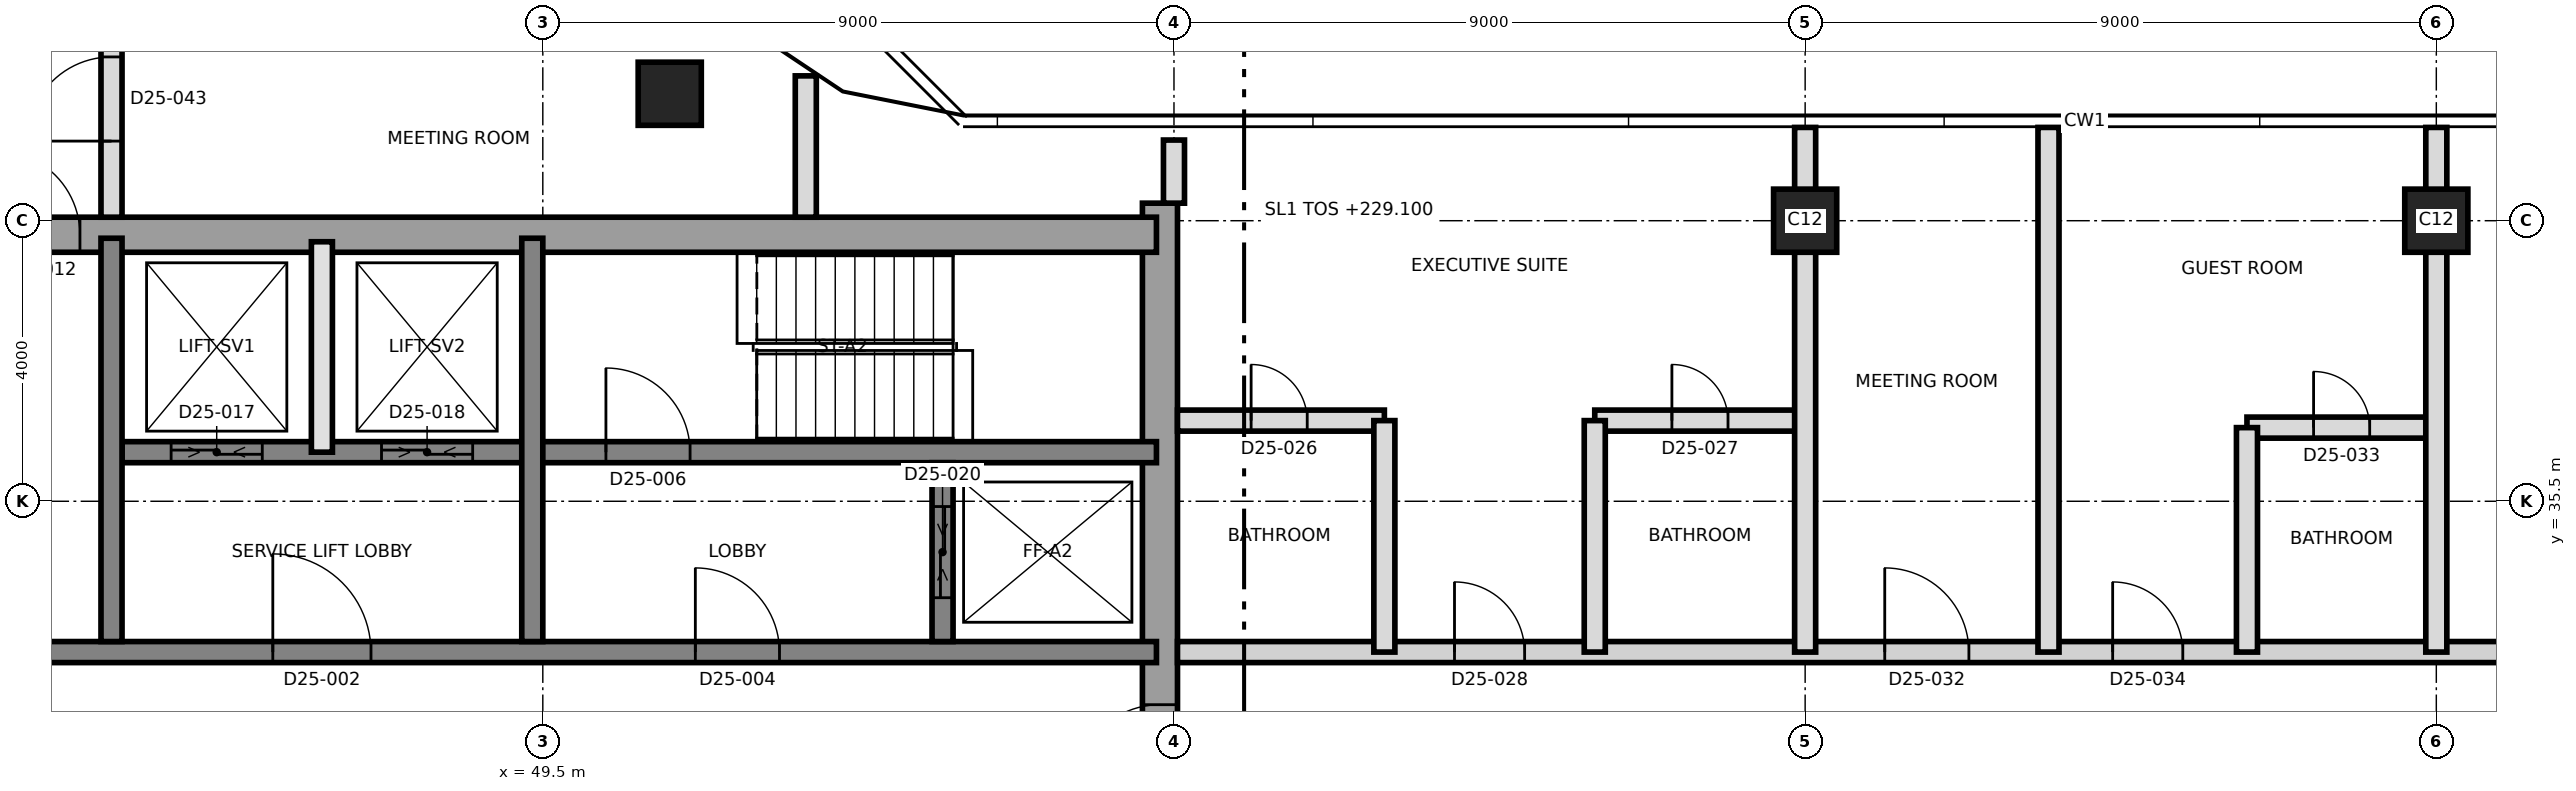
"""IFC4 building model, lengths in metres.
Left out: names, types, materials, properties, quantities, classifications, styles, units other than length and angle.
Written with IfcOpenShell. Run it as: python <this file> out.ifc"""

import sys

from ifc_helpers import new_model, si_unit, direction, frame, frame_2d, origin, origin_2d, place, context, subcontext, project, spatial, rectangle, extrude, element, fill, save


model = new_model("IFC4")
c1 = context("Model", 3, precision=1e-05, world=origin(), true_north=direction((0.0, 1.0)))
c2 = subcontext(c1, "Body", "Model", "MODEL_VIEW")
j1 = project(units=[si_unit("LENGTHUNIT", "METRE"), si_unit("PLANEANGLEUNIT", "RADIAN")], contexts=[c1])
p1 = place(None, origin())
s1 = spatial("IfcSite", under=j1, at=p1, CompositionType="ELEMENT")
p2 = place(p1, origin())
s2 = spatial("IfcBuilding", under=s1, at=p2, CompositionType="ELEMENT")
p3 = place(p2, frame((0.0, 0.0, 229.1)))
s3 = spatial("IfcBuildingStorey", under=s2, at=p3, CompositionType="ELEMENT", Elevation=229.1)
p4 = place(p3, frame((58.3, 21.25, 0.0), z_axis=(0.0, 0.0, 1.0), x_axis=(0.0, 1.0, 0.0)))
e1 = element("IfcWall", 1, at=p4, inside=s3, PredefinedType="SHEAR", context=c2, shape_type="SweptSolid", body=[
    extrude(rectangle(XDim=18.5, YDim=0.5, at=frame_2d((9.25, 0.0))), origin(), (0.0, 0.0, 1.0), 3.7),
])
p5 = place(p4, frame((10.15, 0.0, 0.0)))
e2 = element("IfcOpeningElement", 2, at=p5, cuts=e1, PredefinedType="OPENING", context=c2, shape_type="SweptSolid", body=[
    extrude(rectangle(XDim=1.2, YDim=2.1, at=frame_2d((0.6, 1.05))), frame((0.0, 0.26, 0.0), z_axis=(0.0, -1.0, 0.0), x_axis=(1.0, 0.0, 0.0)), (0.0, 0.0, 1.0), 0.52),
])
p6 = place(p3, frame((31.25, 39.3, 0.0), z_axis=(0.0, 0.0, 1.0), x_axis=(1.0, 0.0, 0.0)))
e3 = element("IfcWall", 3, at=p6, inside=s3, PredefinedType="SHEAR", context=c2, shape_type="SweptSolid", body=[
    extrude(rectangle(XDim=27.0, YDim=0.5, at=frame_2d((13.5, 0.0))), origin(), (0.0, 0.0, 1.0), 3.7),
])
p7 = place(p6, frame((10.45, 0.0, 0.0)))
e4 = element("IfcOpeningElement", 4, at=p7, cuts=e3, PredefinedType="OPENING", context=c2, shape_type="SweptSolid", body=[
    extrude(rectangle(XDim=1.2, YDim=2.1, at=frame_2d((0.6, 1.05))), frame((0.0, 0.26, 0.0), z_axis=(0.0, -1.0, 0.0), x_axis=(1.0, 0.0, 0.0)), (0.0, 0.0, 1.0), 0.52),
])
p8 = place(p3, frame((31.75, 33.35, 0.0), z_axis=(0.0, 0.0, 1.0), x_axis=(1.0, 0.0, 0.0)))
e5 = element("IfcWall", 5, at=p8, inside=s3, PredefinedType="SHEAR", context=c2, shape_type="SweptSolid", body=[
    extrude(rectangle(XDim=26.5, YDim=0.3, at=frame_2d((13.25, 0.0))), origin(), (0.0, 0.0, 1.0), 3.7),
])
p9 = place(p8, frame((13.9, 0.0, 0.0)))
e6 = element("IfcOpeningElement", 6, at=p9, cuts=e5, PredefinedType="OPENING", context=c2, shape_type="SweptSolid", body=[
    extrude(rectangle(XDim=1.4, YDim=2.1, at=frame_2d((0.7, 1.05))), frame((0.0, 0.16, 0.0), z_axis=(0.0, -1.0, 0.0), x_axis=(1.0, 0.0, 0.0)), (0.0, 0.0, 1.0), 0.32),
])
p10 = place(p8, frame((5.375, 0.0, 0.0)))
e7 = element("IfcOpeningElement", 7, at=p10, cuts=e5, PredefinedType="OPENING", context=c2, shape_type="SweptSolid", body=[
    extrude(rectangle(XDim=1.2, YDim=2.1, at=frame_2d((0.6, 1.05))), frame((0.0, 0.16, 0.0), z_axis=(0.0, -1.0, 0.0), x_axis=(1.0, 0.0, 0.0)), (0.0, 0.0, 1.0), 0.32),
])
p11 = place(p8, frame((19.925, 0.0, 0.0)))
e8 = element("IfcOpeningElement", 8, at=p11, cuts=e5, PredefinedType="OPENING", context=c2, shape_type="SweptSolid", body=[
    extrude(rectangle(XDim=1.2, YDim=2.1, at=frame_2d((0.6, 1.05))), frame((0.0, 0.16, 0.0), z_axis=(0.0, -1.0, 0.0), x_axis=(1.0, 0.0, 0.0)), (0.0, 0.0, 1.0), 0.32),
])
p12 = place(p3, frame((43.5, 36.2, 0.0), z_axis=(0.0, 0.0, 1.0), x_axis=(1.0, 0.0, 0.0)))
e9 = element("IfcWall", 9, at=p12, inside=s3, PredefinedType="SHEAR", context=c2, shape_type="SweptSolid", body=[
    extrude(rectangle(XDim=14.75, YDim=0.3, at=frame_2d((7.375, 0.0))), origin(), (0.0, 0.0, 1.0), 3.7),
])
p13 = place(p12, frame((6.9, 0.0, 0.0)))
e10 = element("IfcOpeningElement", 10, at=p13, cuts=e9, PredefinedType="OPENING", context=c2, shape_type="SweptSolid", body=[
    extrude(rectangle(XDim=1.2, YDim=2.1, at=frame_2d((0.6, 1.05))), frame((0.0, 0.16, 0.0), z_axis=(0.0, -1.0, 0.0), x_axis=(1.0, 0.0, 0.0)), (0.0, 0.0, 1.0), 0.32),
])
p14 = place(p12, frame((0.7, 0.0, 0.0)))
e11 = element("IfcOpeningElement", 11, at=p14, cuts=e9, PredefinedType="OPENING", context=c2, shape_type="SweptSolid", body=[
    extrude(rectangle(XDim=1.3, YDim=2.4, at=frame_2d((0.65, 1.2))), frame((0.0, 0.16, 0.0), z_axis=(0.0, -1.0, 0.0), x_axis=(1.0, 0.0, 0.0)), (0.0, 0.0, 1.0), 0.32),
])
p15 = place(p12, frame((3.7, 0.0, 0.0)))
e12 = element("IfcOpeningElement", 12, at=p15, cuts=e9, PredefinedType="OPENING", context=c2, shape_type="SweptSolid", body=[
    extrude(rectangle(XDim=1.3, YDim=2.4, at=frame_2d((0.65, 1.2))), frame((0.0, 0.16, 0.0), z_axis=(0.0, -1.0, 0.0), x_axis=(1.0, 0.0, 0.0)), (0.0, 0.0, 1.0), 0.32),
])
for number, where, z_axis, x_axis in (
    (13, (43.35, 33.5, 0.0), (0.0, 0.0, 1.0), (0.0, 1.0, 0.0)),
    (14, (49.35, 33.5, 0.0), (0.0, 0.0, 1.0), (0.0, 1.0, 0.0)),
):
    element("IfcWall", number, at=place(p3, frame(where, z_axis=z_axis, x_axis=x_axis)), inside=s3, PredefinedType="SHEAR", context=c2, shape_type="SweptSolid", body=[
        extrude(rectangle(XDim=5.75, YDim=0.3, at=frame_2d((2.875, 0.0))), origin(), (0.0, 0.0, 1.0), 3.7),
    ])
p16 = place(p3, frame((55.2, 33.5, 0.0), z_axis=(0.0, 0.0, 1.0), x_axis=(0.0, 1.0, 0.0)))
e15 = element("IfcWall", 15, at=p16, inside=s3, PredefinedType="SHEAR", context=c2, shape_type="SweptSolid", body=[
    extrude(rectangle(XDim=2.55, YDim=0.3, at=frame_2d((1.275, 0.0))), origin(), (0.0, 0.0, 1.0), 3.7),
])
p17 = place(p16, frame((0.625, 0.0, 0.0)))
e16 = element("IfcOpeningElement", 16, at=p17, cuts=e15, PredefinedType="OPENING", context=c2, shape_type="SweptSolid", body=[
    extrude(rectangle(XDim=1.3, YDim=2.4, at=frame_2d((0.65, 1.2))), frame((0.0, 0.16, 0.0), z_axis=(0.0, -1.0, 0.0), x_axis=(1.0, 0.0, 0.0)), (0.0, 0.0, 1.0), 0.32),
])
for number, where, z_axis, x_axis in (
    (17, (67.5, 39.5, 0.0), (0.0, 0.0, 1.0), (1.0, 0.0, 0.0)),
    (18, (76.5, 39.5, 0.0), (0.0, 0.0, 1.0), (1.0, 0.0, 0.0)),
    (19, (51.31, 41.31, 0.0), (0.0, 0.0, 1.0), (1.0, 0.0, 0.0)),
):
    element("IfcColumn", number, at=place(p3, frame(where, z_axis=z_axis, x_axis=x_axis)), inside=s3, PredefinedType="COLUMN", context=c2, shape_type="SweptSolid", body=[
        extrude(rectangle(XDim=0.9, YDim=0.9, at=origin_2d()), origin(), (0.0, 0.0, 1.0), 3.7),
    ])
p18 = place(p3, frame((46.35, 36.2, 0.0), z_axis=(0.0, 0.0, 1.0), x_axis=(0.0, 1.0, 0.0)))
e20 = element("IfcWall", 20, at=p18, inside=s3, PredefinedType="SOLIDWALL", context=c2, shape_type="SweptSolid", body=[
    extrude(rectangle(XDim=3.0, YDim=0.3, at=frame_2d((1.5, 0.0))), origin(), (0.0, 0.0, 1.0), 3.4),
])
p19 = place(p3, frame((58.55, 33.35, 0.0), z_axis=(0.0, 0.0, 1.0), x_axis=(1.0, 0.0, 0.0)))
e21 = element("IfcWall", 21, at=p19, inside=s3, PredefinedType="PARTITIONING", context=c2, shape_type="SweptSolid", body=[
    extrude(rectangle(XDim=26.78, YDim=0.3, at=frame_2d((13.39, 0.0))), origin(), (0.0, 0.0, 1.0), 3.4),
])
p20 = place(p19, frame((3.95, 0.0, 0.0)))
e22 = element("IfcOpeningElement", 22, at=p20, cuts=e21, PredefinedType="OPENING", context=c2, shape_type="SweptSolid", body=[
    extrude(rectangle(XDim=1.0, YDim=2.4, at=frame_2d((0.5, 1.2))), frame((0.0, 0.16, 0.0), z_axis=(0.0, -1.0, 0.0), x_axis=(1.0, 0.0, 0.0)), (0.0, 0.0, 1.0), 0.32),
])
p21 = place(p19, frame((10.085, 0.0, 0.0)))
e23 = element("IfcOpeningElement", 23, at=p21, cuts=e21, PredefinedType="OPENING", context=c2, shape_type="SweptSolid", body=[
    extrude(rectangle(XDim=1.2, YDim=2.1, at=frame_2d((0.6, 1.05))), frame((0.0, 0.16, 0.0), z_axis=(0.0, -1.0, 0.0), x_axis=(1.0, 0.0, 0.0)), (0.0, 0.0, 1.0), 0.32),
])
p22 = place(p19, frame((13.335, 0.0, 0.0)))
e24 = element("IfcOpeningElement", 24, at=p22, cuts=e21, PredefinedType="OPENING", context=c2, shape_type="SweptSolid", body=[
    extrude(rectangle(XDim=1.0, YDim=2.1, at=frame_2d((0.5, 1.05))), frame((0.0, 0.16, 0.0), z_axis=(0.0, -1.0, 0.0), x_axis=(1.0, 0.0, 0.0)), (0.0, 0.0, 1.0), 0.32),
])
p23 = place(p19, frame((20.3, 0.0, 0.0)))
e25 = element("IfcOpeningElement", 25, at=p23, cuts=e21, PredefinedType="OPENING", context=c2, shape_type="SweptSolid", body=[
    extrude(rectangle(XDim=1.0, YDim=2.4, at=frame_2d((0.5, 1.2))), frame((0.0, 0.16, 0.0), z_axis=(0.0, -1.0, 0.0), x_axis=(1.0, 0.0, 0.0)), (0.0, 0.0, 1.0), 0.32),
])
p24 = place(p3, frame((73.8, 36.55, 0.0), z_axis=(0.0, 0.0, 1.0), x_axis=(1.0, 0.0, 0.0)))
e26 = element("IfcWall", 26, at=p24, inside=s3, PredefinedType="PARTITIONING", context=c2, shape_type="SweptSolid", body=[
    extrude(rectangle(XDim=2.7, YDim=0.3, at=frame_2d((1.35, 0.0))), origin(), (0.0, 0.0, 1.0), 3.4),
])
p25 = place(p24, frame((0.95, 0.0, 0.0)))
e27 = element("IfcOpeningElement", 27, at=p25, cuts=e26, PredefinedType="OPENING", context=c2, shape_type="SweptSolid", body=[
    extrude(rectangle(XDim=0.8, YDim=2.1, at=frame_2d((0.4, 1.05))), frame((0.0, 0.16, 0.0), z_axis=(0.0, -1.0, 0.0), x_axis=(1.0, 0.0, 0.0)), (0.0, 0.0, 1.0), 0.32),
])
p26 = place(p3, frame((58.55, 36.65, 0.0), z_axis=(0.0, 0.0, 1.0), x_axis=(1.0, 0.0, 0.0)))
e28 = element("IfcWall", 28, at=p26, inside=s3, PredefinedType="PARTITIONING", context=c2, shape_type="SweptSolid", body=[
    extrude(rectangle(XDim=2.95, YDim=0.3, at=frame_2d((1.475, 0.0))), origin(), (0.0, 0.0, 1.0), 3.4),
])
p27 = place(p26, frame((1.05, 0.0, 0.0)))
e29 = element("IfcOpeningElement", 29, at=p27, cuts=e28, PredefinedType="OPENING", context=c2, shape_type="SweptSolid", body=[
    extrude(rectangle(XDim=0.8, YDim=2.1, at=frame_2d((0.4, 1.05))), frame((0.0, 0.16, 0.0), z_axis=(0.0, -1.0, 0.0), x_axis=(1.0, 0.0, 0.0)), (0.0, 0.0, 1.0), 0.32),
])
p28 = place(p3, frame((64.5, 36.65, 0.0), z_axis=(0.0, 0.0, 1.0), x_axis=(1.0, 0.0, 0.0)))
e30 = element("IfcWall", 30, at=p28, inside=s3, PredefinedType="PARTITIONING", context=c2, shape_type="SweptSolid", body=[
    extrude(rectangle(XDim=3.0, YDim=0.3, at=frame_2d((1.5, 0.0))), origin(), (0.0, 0.0, 1.0), 3.4),
])
p29 = place(p28, frame((1.1, 0.0, 0.0)))
e31 = element("IfcOpeningElement", 31, at=p29, cuts=e30, PredefinedType="OPENING", context=c2, shape_type="SweptSolid", body=[
    extrude(rectangle(XDim=0.8, YDim=2.1, at=frame_2d((0.4, 1.05))), frame((0.0, 0.16, 0.0), z_axis=(0.0, -1.0, 0.0), x_axis=(1.0, 0.0, 0.0)), (0.0, 0.0, 1.0), 0.32),
])
p30 = place(p3, frame((43.35, 39.55, 0.0), z_axis=(0.0, 0.0, 1.0), x_axis=(0.0, 1.0, 0.0)))
e32 = element("IfcWall", 32, at=p30, inside=s3, PredefinedType="PARTITIONING", context=c2, shape_type="SweptSolid", body=[
    extrude(rectangle(XDim=18.771, YDim=0.3, at=frame_2d((9.385, 0.0))), origin(), (0.0, 0.0, 1.0), 3.4),
])
p31 = place(p30, frame((1.085, 0.0, 0.0)))
e33 = element("IfcOpeningElement", 33, at=p31, cuts=e32, PredefinedType="OPENING", context=c2, shape_type="SweptSolid", body=[
    extrude(rectangle(XDim=1.2, YDim=2.1, at=frame_2d((0.6, 1.05))), frame((0.0, 0.16, 0.0), z_axis=(0.0, -1.0, 0.0), x_axis=(1.0, 0.0, 0.0)), (0.0, 0.0, 1.0), 0.32),
])
p32 = place(p30, frame((4.335, 0.0, 0.0)))
e34 = element("IfcOpeningElement", 34, at=p32, cuts=e32, PredefinedType="OPENING", context=c2, shape_type="SweptSolid", body=[
    extrude(rectangle(XDim=1.0, YDim=2.1, at=frame_2d((0.5, 1.05))), frame((0.0, 0.16, 0.0), z_axis=(0.0, -1.0, 0.0), x_axis=(1.0, 0.0, 0.0)), (0.0, 0.0, 1.0), 0.32),
])
p33 = place(p30, frame((14.6, 0.0, 0.0)))
e35 = element("IfcOpeningElement", 35, at=p33, cuts=e32, PredefinedType="OPENING", context=c2, shape_type="SweptSolid", body=[
    extrude(rectangle(XDim=1.0, YDim=2.4, at=frame_2d((0.5, 1.2))), frame((0.0, 0.16, 0.0), z_axis=(0.0, -1.0, 0.0), x_axis=(1.0, 0.0, 0.0)), (0.0, 0.0, 1.0), 0.32),
])
p34 = place(p3, frame((53.25, 39.55, 0.0), z_axis=(0.0, 0.0, 1.0), x_axis=(0.0, 1.0, 0.0)))
e36 = element("IfcWall", 36, at=p34, inside=s3, PredefinedType="PARTITIONING", context=c2, shape_type="SweptSolid", body=[
    extrude(rectangle(XDim=2.015, YDim=0.3, at=frame_2d((1.007, 0.0))), origin(), (0.0, 0.0, 1.0), 3.4),
])
p35 = place(p3, frame((58.5, 39.75, 0.0), z_axis=(0.0, 0.0, 1.0), x_axis=(0.0, 1.0, 0.0)))
e37 = element("IfcWall", 37, at=p35, inside=s3, PredefinedType="PARTITIONING", context=c2, shape_type="SweptSolid", body=[
    extrude(rectangle(XDim=0.9, YDim=0.3, at=frame_2d((0.45, 0.0))), origin(), (0.0, 0.0, 1.0), 3.4),
])
for number, where, z_axis, x_axis in (
    (38, (61.5, 33.35, 0.0), (0.0, 0.0, 1.0), (0.0, 1.0, 0.0)),
    (39, (64.5, 33.35, 0.0), (0.0, 0.0, 1.0), (0.0, 1.0, 0.0)),
):
    element("IfcWall", number, at=place(p3, frame(where, z_axis=z_axis, x_axis=x_axis)), inside=s3, PredefinedType="PARTITIONING", context=c2, shape_type="SweptSolid", body=[
        extrude(rectangle(XDim=3.3, YDim=0.3, at=frame_2d((1.65, 0.0))), origin(), (0.0, 0.0, 1.0), 3.4),
    ])
for number, where, z_axis, x_axis in (
    (40, (67.5, 33.35, 0.0), (0.0, 0.0, 1.0), (0.0, 1.0, 0.0)),
    (41, (70.97, 33.35, 0.0), (0.0, 0.0, 1.0), (0.0, 1.0, 0.0)),
):
    element("IfcWall", number, at=place(p3, frame(where, z_axis=z_axis, x_axis=x_axis)), inside=s3, PredefinedType="PARTITIONING", context=c2, shape_type="SweptSolid", body=[
        extrude(rectangle(XDim=7.48, YDim=0.3, at=frame_2d((3.74, 0.0))), origin(), (0.0, 0.0, 1.0), 3.4),
    ])
p36 = place(p3, frame((73.8, 33.35, 0.0), z_axis=(0.0, 0.0, 1.0), x_axis=(0.0, 1.0, 0.0)))
e42 = element("IfcWall", 42, at=p36, inside=s3, PredefinedType="PARTITIONING", context=c2, shape_type="SweptSolid", body=[
    extrude(rectangle(XDim=3.2, YDim=0.3, at=frame_2d((1.6, 0.0))), origin(), (0.0, 0.0, 1.0), 3.4),
])
p37 = place(p3, frame((76.5, 33.35, 0.0), z_axis=(0.0, 0.0, 1.0), x_axis=(0.0, 1.0, 0.0)))
e43 = element("IfcWall", 43, at=p37, inside=s3, PredefinedType="PARTITIONING", context=c2, shape_type="SweptSolid", body=[
    extrude(rectangle(XDim=7.48, YDim=0.3, at=frame_2d((3.74, 0.0))), origin(), (0.0, 0.0, 1.0), 3.4),
])
p38 = place(p9, origin())
e44 = element("IfcDoor", 44, at=p38, inside=s3, OperationType="SINGLE_SWING_RIGHT", PredefinedType="DOOR", context=c2, shape_type="SweptSolid", body=[
    extrude(rectangle(XDim=1.4, YDim=2.1, at=frame_2d((0.7, 1.05))), frame((0.0, 0.025, 0.0), z_axis=(0.0, -1.0, 0.0), x_axis=(1.0, 0.0, 0.0)), (0.0, 0.0, 1.0), 0.05),
])
fill(e6, e44)
p39 = place(p11, origin())
e45 = element("IfcDoor", 45, at=p39, inside=s3, OperationType="SINGLE_SWING_RIGHT", PredefinedType="DOOR", context=c2, shape_type="SweptSolid", body=[
    extrude(rectangle(XDim=1.2, YDim=2.1, at=frame_2d((0.6, 1.05))), frame((0.0, 0.025, 0.0), z_axis=(0.0, -1.0, 0.0), x_axis=(1.0, 0.0, 0.0)), (0.0, 0.0, 1.0), 0.05),
])
fill(e8, e45)
p40 = place(p13, origin())
e46 = element("IfcDoor", 46, at=p40, inside=s3, OperationType="SINGLE_SWING_LEFT", PredefinedType="DOOR", context=c2, shape_type="SweptSolid", body=[
    extrude(rectangle(XDim=1.2, YDim=2.1, at=frame_2d((0.6, 1.05))), frame((0.0, 0.025, 0.0), z_axis=(0.0, -1.0, 0.0), x_axis=(1.0, 0.0, 0.0)), (0.0, 0.0, 1.0), 0.05),
])
fill(e10, e46)
p41 = place(p5, origin())
e47 = element("IfcDoor", 47, at=p41, inside=s3, OperationType="SINGLE_SWING_LEFT", PredefinedType="DOOR", context=c2, shape_type="SweptSolid", body=[
    extrude(rectangle(XDim=1.2, YDim=2.1, at=frame_2d((0.6, 1.05))), frame((0.0, 0.025, 0.0), z_axis=(0.0, -1.0, 0.0), x_axis=(1.0, 0.0, 0.0)), (0.0, 0.0, 1.0), 0.05),
])
fill(e2, e47)
p42 = place(p7, origin())
e48 = element("IfcDoor", 48, at=p42, inside=s3, OperationType="SINGLE_SWING_RIGHT", PredefinedType="DOOR", context=c2, shape_type="SweptSolid", body=[
    extrude(rectangle(XDim=1.2, YDim=2.1, at=frame_2d((0.6, 1.05))), frame((0.0, 0.025, 0.0), z_axis=(0.0, -1.0, 0.0), x_axis=(1.0, 0.0, 0.0)), (0.0, 0.0, 1.0), 0.05),
])
fill(e4, e48)
p43 = place(p14, origin())
e49 = element("IfcDoor", 49, at=p43, inside=s3, OperationType="SLIDING_TO_LEFT", PredefinedType="DOOR", context=c2, shape_type="SweptSolid", body=[
    extrude(rectangle(XDim=1.3, YDim=2.4, at=frame_2d((0.65, 1.2))), frame((0.0, 0.025, 0.0), z_axis=(0.0, -1.0, 0.0), x_axis=(1.0, 0.0, 0.0)), (0.0, 0.0, 1.0), 0.05),
])
fill(e11, e49)
p44 = place(p15, origin())
e50 = element("IfcDoor", 50, at=p44, inside=s3, OperationType="SLIDING_TO_LEFT", PredefinedType="DOOR", context=c2, shape_type="SweptSolid", body=[
    extrude(rectangle(XDim=1.3, YDim=2.4, at=frame_2d((0.65, 1.2))), frame((0.0, 0.025, 0.0), z_axis=(0.0, -1.0, 0.0), x_axis=(1.0, 0.0, 0.0)), (0.0, 0.0, 1.0), 0.05),
])
fill(e12, e50)
p45 = place(p17, origin())
e51 = element("IfcDoor", 51, at=p45, inside=s3, OperationType="SLIDING_TO_LEFT", PredefinedType="DOOR", context=c2, shape_type="SweptSolid", body=[
    extrude(rectangle(XDim=1.3, YDim=2.4, at=frame_2d((0.65, 1.2))), frame((0.0, 0.025, 0.0), z_axis=(0.0, -1.0, 0.0), x_axis=(1.0, 0.0, 0.0)), (0.0, 0.0, 1.0), 0.05),
])
fill(e16, e51)
p46 = place(p27, origin())
e52 = element("IfcDoor", 52, at=p46, inside=s3, OperationType="SINGLE_SWING_LEFT", PredefinedType="DOOR", context=c2, shape_type="SweptSolid", body=[
    extrude(rectangle(XDim=0.8, YDim=2.1, at=frame_2d((0.4, 1.05))), frame((0.0, 0.025, 0.0), z_axis=(0.0, -1.0, 0.0), x_axis=(1.0, 0.0, 0.0)), (0.0, 0.0, 1.0), 0.05),
])
fill(e29, e52)
p47 = place(p29, origin())
e53 = element("IfcDoor", 53, at=p47, inside=s3, OperationType="SINGLE_SWING_RIGHT", PredefinedType="DOOR", context=c2, shape_type="SweptSolid", body=[
    extrude(rectangle(XDim=0.8, YDim=2.1, at=frame_2d((0.4, 1.05))), frame((0.0, 0.025, 0.0), z_axis=(0.0, -1.0, 0.0), x_axis=(1.0, 0.0, 0.0)), (0.0, 0.0, 1.0), 0.05),
])
fill(e31, e53)
p48 = place(p20, origin())
e54 = element("IfcDoor", 54, at=p48, inside=s3, OperationType="SINGLE_SWING_LEFT", PredefinedType="DOOR", context=c2, shape_type="SweptSolid", body=[
    extrude(rectangle(XDim=1.0, YDim=2.4, at=frame_2d((0.5, 1.2))), frame((0.0, 0.025, 0.0), z_axis=(0.0, -1.0, 0.0), x_axis=(1.0, 0.0, 0.0)), (0.0, 0.0, 1.0), 0.05),
])
fill(e22, e54)
p49 = place(p21, origin())
e55 = element("IfcDoor", 55, at=p49, inside=s3, OperationType="SINGLE_SWING_LEFT", PredefinedType="DOOR", context=c2, shape_type="SweptSolid", body=[
    extrude(rectangle(XDim=1.2, YDim=2.1, at=frame_2d((0.6, 1.05))), frame((0.0, 0.025, 0.0), z_axis=(0.0, -1.0, 0.0), x_axis=(1.0, 0.0, 0.0)), (0.0, 0.0, 1.0), 0.05),
])
fill(e23, e55)
p50 = place(p25, origin())
e56 = element("IfcDoor", 56, at=p50, inside=s3, OperationType="SINGLE_SWING_RIGHT", PredefinedType="DOOR", context=c2, shape_type="SweptSolid", body=[
    extrude(rectangle(XDim=0.8, YDim=2.1, at=frame_2d((0.4, 1.05))), frame((0.0, 0.025, 0.0), z_axis=(0.0, -1.0, 0.0), x_axis=(1.0, 0.0, 0.0)), (0.0, 0.0, 1.0), 0.05),
])
fill(e27, e56)
p51 = place(p22, origin())
e57 = element("IfcDoor", 57, at=p51, inside=s3, OperationType="SINGLE_SWING_LEFT", PredefinedType="DOOR", context=c2, shape_type="SweptSolid", body=[
    extrude(rectangle(XDim=1.0, YDim=2.1, at=frame_2d((0.5, 1.05))), frame((0.0, 0.025, 0.0), z_axis=(0.0, -1.0, 0.0), x_axis=(1.0, 0.0, 0.0)), (0.0, 0.0, 1.0), 0.05),
])
fill(e24, e57)
p52 = place(p31, origin())
e58 = element("IfcDoor", 58, at=p52, inside=s3, OperationType="SINGLE_SWING_RIGHT", PredefinedType="DOOR", context=c2, shape_type="SweptSolid", body=[
    extrude(rectangle(XDim=1.2, YDim=2.1, at=frame_2d((0.6, 1.05))), frame((0.0, 0.025, 0.0), z_axis=(0.0, -1.0, 0.0), x_axis=(1.0, 0.0, 0.0)), (0.0, 0.0, 1.0), 0.05),
])
fill(e33, e58)
save(model, sys.argv[1])
